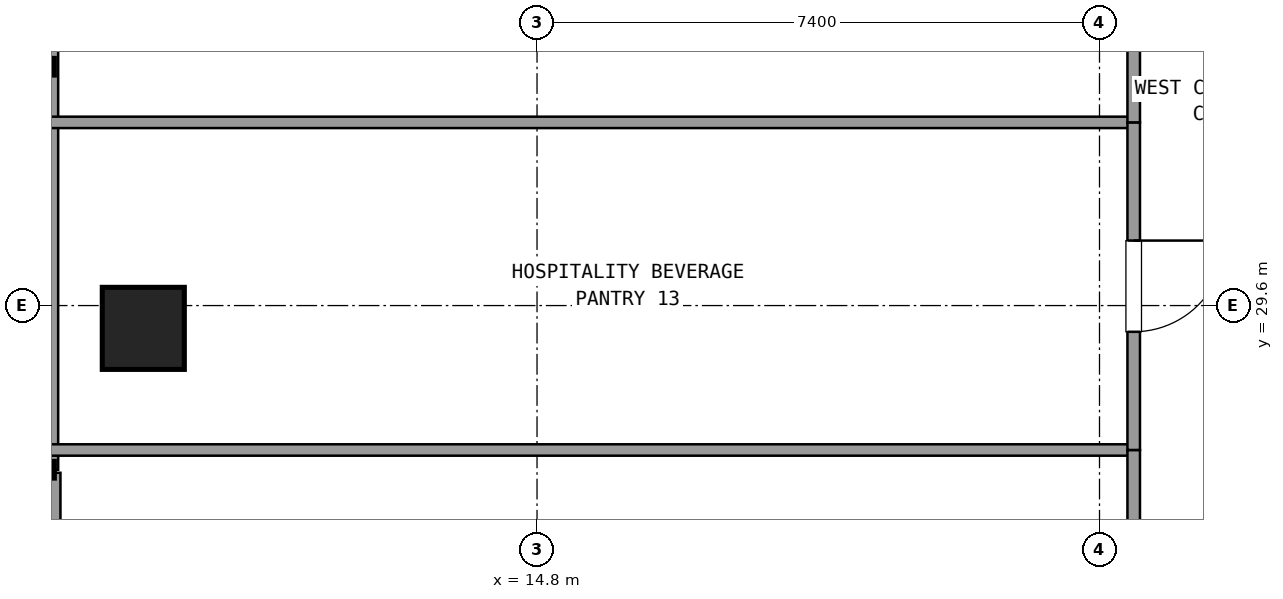
"""IFC4 building model, lengths in metres.
Left out: names, types, materials, properties, quantities, classifications, styles, units other than length and angle.
Written with IfcOpenShell. Run it as: python <this file> out.ifc"""

import sys

from ifc_helpers import new_model, si_unit, direction, frame, frame_2d, origin, origin_2d, place, context, subcontext, project, spatial, rectangle, extrude, element, fill, save


model = new_model("IFC4")
c1 = context("Model", 3, precision=1e-05, world=origin(), true_north=direction((0.0, 1.0)))
c2 = subcontext(c1, "Body", "Model", "MODEL_VIEW")
j1 = project(units=[si_unit("LENGTHUNIT", "METRE"), si_unit("PLANEANGLEUNIT", "RADIAN")], contexts=[c1])
p1 = place(None, origin())
s1 = spatial("IfcSite", under=j1, at=p1, CompositionType="ELEMENT")
p2 = place(p1, origin())
s2 = spatial("IfcBuilding", under=s1, at=p2, CompositionType="ELEMENT")
p3 = place(p2, frame((0.0, 0.0, 49.14)))
s3 = spatial("IfcBuildingStorey", under=s2, at=p3, CompositionType="ELEMENT", Elevation=49.14)
p4 = place(p3, frame((9.62, 29.3, 0.0), z_axis=(0.0, 0.0, 1.0), x_axis=(1.0, 0.0, 0.0)))
e1 = element("IfcColumn", 1, at=p4, inside=s3, PredefinedType="COLUMN", context=c2, shape_type="SweptSolid", body=[
    extrude(rectangle(XDim=1.08, YDim=1.08, at=origin_2d()), origin(), (0.0, 0.0, 1.0), 3.6),
])
p5 = place(p3, frame((8.38, 27.4, 0.0), z_axis=(0.0, 0.0, 1.0), x_axis=(0.0, -1.0, 0.0)))
e2 = element("IfcWall", 2, at=p5, inside=s3, PredefinedType="SOLIDWALL", context=c2, shape_type="SweptSolid", body=[
    extrude(rectangle(XDim=3.0, YDim=0.3, at=frame_2d((1.5, 0.0))), origin(), (0.0, 0.0, 1.0), 2.65),
])
p6 = place(p5, frame((0.9, 0.0, 0.0)))
e3 = element("IfcOpeningElement", 3, at=p6, cuts=e2, PredefinedType="OPENING", context=c2, shape_type="SweptSolid", body=[
    extrude(rectangle(XDim=1.2, YDim=2.2, at=frame_2d((0.6, 1.1))), frame((0.0, 0.16, 0.0), z_axis=(0.0, -1.0, 0.0), x_axis=(1.0, 0.0, 0.0)), (0.0, 0.0, 1.0), 0.32),
])
p7 = place(p3, frame((8.38, 43.345, 0.0), z_axis=(0.0, 0.0, 1.0), x_axis=(0.0, -1.0, 0.0)))
e4 = element("IfcWall", 4, at=p7, inside=s3, PredefinedType="SOLIDWALL", context=c2, shape_type="SweptSolid", body=[
    extrude(rectangle(XDim=15.905, YDim=0.24, at=frame_2d((7.953, 0.0))), origin(), (0.0, 0.0, 1.0), 0.85),
])
p8 = place(p3, frame((22.65, 27.7, 0.0), z_axis=(0.0, 0.0, 1.0), x_axis=(-1.0, 0.0, 0.0)))
e5 = element("IfcWall", 5, at=p8, inside=s3, PredefinedType="PARTITIONING", context=c2, shape_type="SweptSolid", body=[
    extrude(rectangle(XDim=14.25, YDim=0.15, at=frame_2d((7.125, 0.0))), origin(), (0.0, 0.0, 1.0), 2.61),
])
p9 = place(p3, frame((22.65, 20.025, 0.0), z_axis=(0.0, 0.0, 1.0), x_axis=(0.0, 1.0, 0.0)))
e6 = element("IfcWall", 6, at=p9, inside=s3, PredefinedType="PARTITIONING", context=c2, shape_type="SweptSolid", body=[
    extrude(rectangle(XDim=7.675, YDim=0.165, at=frame_2d((3.837, 0.0))), origin(), (0.0, 0.0, 1.0), 2.61),
])
p10 = place(p9, frame((3.238, 0.0, 0.0)))
e7 = element("IfcOpeningElement", 7, at=p10, cuts=e6, PredefinedType="OPENING", context=c2, shape_type="SweptSolid", body=[
    extrude(rectangle(XDim=1.2, YDim=2.15, at=frame_2d((0.6, 1.075))), frame((0.0, 0.093, 0.0), z_axis=(0.0, -1.0, 0.0), x_axis=(1.0, 0.0, 0.0)), (0.0, 0.0, 1.0), 0.185),
])
p11 = place(p3, frame((22.65, 32.01, 0.0), z_axis=(0.0, 0.0, 1.0), x_axis=(-1.0, 0.0, 0.0)))
e8 = element("IfcWall", 8, at=p11, inside=s3, PredefinedType="PARTITIONING", context=c2, shape_type="SweptSolid", body=[
    extrude(rectangle(XDim=14.25, YDim=0.15, at=frame_2d((7.125, 0.0))), origin(), (0.0, 0.0, 1.0), 2.61),
])
p12 = place(p3, frame((22.65, 27.7, 0.0), z_axis=(0.0, 0.0, 1.0), x_axis=(0.0, 1.0, 0.0)))
e9 = element("IfcWall", 9, at=p12, inside=s3, PredefinedType="PARTITIONING", context=c2, shape_type="SweptSolid", body=[
    extrude(rectangle(XDim=4.31, YDim=0.165, at=frame_2d((2.155, 0.0))), origin(), (0.0, 0.0, 1.0), 2.61),
])
p13 = place(p12, frame((1.555, 0.0, 0.0)))
e10 = element("IfcOpeningElement", 10, at=p13, cuts=e9, PredefinedType="OPENING", context=c2, shape_type="SweptSolid", body=[
    extrude(rectangle(XDim=1.2, YDim=2.15, at=frame_2d((0.6, 1.075))), frame((0.0, 0.093, 0.0), z_axis=(0.0, -1.0, 0.0), x_axis=(1.0, 0.0, 0.0)), (0.0, 0.0, 1.0), 0.185),
])
p14 = place(p3, frame((22.65, 32.01, 0.0), z_axis=(0.0, 0.0, 1.0), x_axis=(0.0, 1.0, 0.0)))
e11 = element("IfcWall", 11, at=p14, inside=s3, PredefinedType="PARTITIONING", context=c2, shape_type="SweptSolid", body=[
    extrude(rectangle(XDim=5.64, YDim=0.165, at=frame_2d((2.82, 0.0))), origin(), (0.0, 0.0, 1.0), 2.61),
])
p15 = place(p14, frame((2.22, 0.0, 0.0)))
e12 = element("IfcOpeningElement", 12, at=p15, cuts=e11, PredefinedType="OPENING", context=c2, shape_type="SweptSolid", body=[
    extrude(rectangle(XDim=1.2, YDim=2.15, at=frame_2d((0.6, 1.075))), frame((0.0, 0.093, 0.0), z_axis=(0.0, -1.0, 0.0), x_axis=(1.0, 0.0, 0.0)), (0.0, 0.0, 1.0), 0.185),
])
p16 = place(p13, frame((1.2, 0.0, 0.0), z_axis=(0.0, 0.0, 1.0), x_axis=(-1.0, 0.0, 0.0)))
e13 = element("IfcDoor", 13, at=p16, inside=s3, OperationType="SINGLE_SWING_RIGHT", PredefinedType="DOOR", context=c2, shape_type="SweptSolid", body=[
    extrude(rectangle(XDim=1.2, YDim=2.15, at=frame_2d((0.6, 1.075))), frame((0.0, 0.025, 0.0), z_axis=(0.0, -1.0, 0.0), x_axis=(1.0, 0.0, 0.0)), (0.0, 0.0, 1.0), 0.05),
])
fill(e10, e13)
save(model, sys.argv[1])
